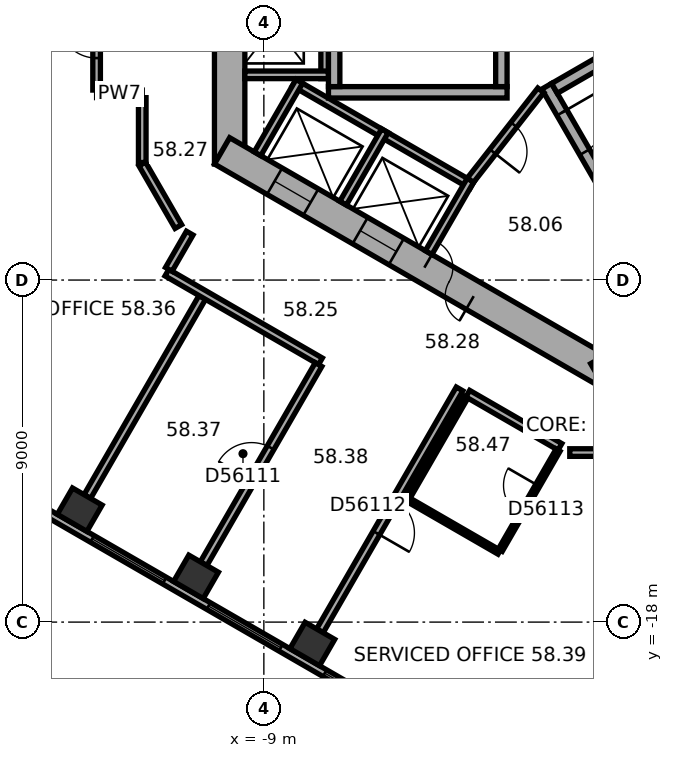
"""IFC4 building model, lengths in metres.
Left out: names, types, materials, properties, quantities, classifications, styles, units other than length and angle.
Written with IfcOpenShell. Run it as: python <this file> out.ifc"""

import sys

from ifc_helpers import new_model, si_unit, direction, frame, frame_2d, origin, origin_2d, place, context, subcontext, project, spatial, rectangle, extrude, element, fill, save


model = new_model("IFC4")
c1 = context("Model", 3, precision=1e-05, world=origin(), true_north=direction((0.0, 1.0)))
c2 = subcontext(c1, "Body", "Model", "MODEL_VIEW")
j1 = project(units=[si_unit("LENGTHUNIT", "METRE"), si_unit("PLANEANGLEUNIT", "RADIAN")], contexts=[c1])
p1 = place(None, origin())
s1 = spatial("IfcSite", under=j1, at=p1, CompositionType="ELEMENT")
p2 = place(p1, origin())
s2 = spatial("IfcBuilding", under=s1, at=p2, CompositionType="ELEMENT")
p3 = place(p2, frame((0.0, 0.0, 236.5)))
s3 = spatial("IfcBuildingStorey", under=s2, at=p3, CompositionType="ELEMENT", Elevation=236.5)
for number, where, z_axis, x_axis in (
    (1, (-13.845, -15.042, 0.0), (0.0, 0.0, 1.0), (0.866, -0.5, 0.0)),
    (2, (-10.785, -16.809, 0.0), (0.0, 0.0, 1.0), (0.866, -0.5, 0.0)),
    (3, (-7.725, -18.576, 0.0), (0.0, 0.0, 1.0), (0.866, -0.5, 0.0)),
):
    element("IfcColumn", number, at=place(p3, frame(where, z_axis=z_axis, x_axis=x_axis)), inside=s3, PredefinedType="COLUMN", context=c2, shape_type="SweptSolid", body=[
        extrude(rectangle(XDim=0.9, YDim=0.8, at=origin_2d()), origin(), (0.0, 0.0, 1.0), 3.7),
    ])
p4 = place(p3, frame((-9.9, 5.947, 0.0), z_axis=(0.0, 0.0, 1.0), x_axis=(0.0, -1.0, 0.0)))
e4 = element("IfcWall", 4, at=p4, inside=s3, PredefinedType="SHEAR", context=c2, shape_type="SweptSolid", body=[
    extrude(rectangle(XDim=11.894, YDim=0.8, at=frame_2d((5.947, 0.0))), origin(), (0.0, 0.0, 1.0), 3.7),
])
p5 = place(p4, frame((5.097, 0.0, 0.0)))
e5 = element("IfcOpeningElement", 5, at=p5, cuts=e4, PredefinedType="OPENING", context=c2, shape_type="SweptSolid", body=[
    extrude(rectangle(XDim=1.1, YDim=2.1, at=frame_2d((0.55, 1.05))), frame((0.0, 0.41, 0.0), z_axis=(0.0, -1.0, 0.0), x_axis=(1.0, 0.0, 0.0)), (0.0, 0.0, 1.0), 0.82),
])
p6 = place(p4, frame((7.697, 0.0, 0.0)))
e6 = element("IfcOpeningElement", 6, at=p6, cuts=e4, PredefinedType="OPENING", context=c2, shape_type="SweptSolid", body=[
    extrude(rectangle(XDim=1.1, YDim=2.1, at=frame_2d((0.55, 1.05))), frame((0.0, 0.41, 0.0), z_axis=(0.0, -1.0, 0.0), x_axis=(1.0, 0.0, 0.0)), (0.0, 0.0, 1.0), 0.82),
])
p7 = place(p3, frame((-10.1, -5.6, 0.0), z_axis=(0.0, 0.0, 1.0), x_axis=(0.866023897231, -0.500002609418, 0.0)))
e7 = element("IfcWall", 7, at=p7, inside=s3, PredefinedType="SHEAR", context=c2, shape_type="SweptSolid", body=[
    extrude(rectangle(XDim=11.894, YDim=0.8, at=frame_2d((5.947, 0.0))), origin(), (0.0, 0.0, 1.0), 3.7),
])
p8 = place(p7, frame((6.147, 0.0, 0.0)))
e8 = element("IfcOpeningElement", 8, at=p8, cuts=e7, PredefinedType="OPENING", context=c2, shape_type="SweptSolid", body=[
    extrude(rectangle(XDim=1.5, YDim=2.1, at=frame_2d((0.75, 1.05))), frame((0.0, 0.41, 0.0), z_axis=(0.0, -1.0, 0.0), x_axis=(1.0, 0.0, 0.0)), (0.0, 0.0, 1.0), 0.82),
])
p9 = place(p7, frame((1.597, 0.0, 0.0)))
e9 = element("IfcOpeningElement", 9, at=p9, cuts=e7, PredefinedType="OPENING", context=c2, shape_type="SweptSolid", body=[
    extrude(rectangle(XDim=1.1, YDim=2.1, at=frame_2d((0.55, 1.05))), frame((0.0, 0.41, 0.0), z_axis=(0.0, -1.0, 0.0), x_axis=(1.0, 0.0, 0.0)), (0.0, 0.0, 1.0), 0.82),
])
p10 = place(p7, frame((4.197, 0.0, 0.0)))
e10 = element("IfcOpeningElement", 10, at=p10, cuts=e7, PredefinedType="OPENING", context=c2, shape_type="SweptSolid", body=[
    extrude(rectangle(XDim=1.1, YDim=2.1, at=frame_2d((0.55, 1.05))), frame((0.0, 0.41, 0.0), z_axis=(0.0, -1.0, 0.0), x_axis=(1.0, 0.0, 0.0)), (0.0, 0.0, 1.0), 0.82),
])
p11 = place(p3, frame((-0.2, -11.547, 0.0), z_axis=(0.0, 0.0, 1.0), x_axis=(0.866023897231, 0.500002609418, 0.0)))
e11 = element("IfcWall", 11, at=p11, inside=s3, PredefinedType="SHEAR", context=c2, shape_type="SweptSolid", body=[
    extrude(rectangle(XDim=11.894, YDim=0.8, at=frame_2d((5.947, 0.0))), origin(), (0.0, 0.0, 1.0), 3.7),
])
p12 = place(p11, frame((2.497, 0.0, 0.0)))
e12 = element("IfcOpeningElement", 12, at=p12, cuts=e11, PredefinedType="OPENING", context=c2, shape_type="SweptSolid", body=[
    extrude(rectangle(XDim=1.1, YDim=2.1, at=frame_2d((0.55, 1.05))), frame((0.0, 0.41, 0.0), z_axis=(0.0, -1.0, 0.0), x_axis=(1.0, 0.0, 0.0)), (0.0, 0.0, 1.0), 0.82),
])
p13 = place(p11, frame((5.097, 0.0, 0.0)))
e13 = element("IfcOpeningElement", 13, at=p13, cuts=e11, PredefinedType="OPENING", context=c2, shape_type="SweptSolid", body=[
    extrude(rectangle(XDim=1.1, YDim=2.1, at=frame_2d((0.55, 1.05))), frame((0.0, 0.41, 0.0), z_axis=(0.0, -1.0, 0.0), x_axis=(1.0, 0.0, 0.0)), (0.0, 0.0, 1.0), 0.82),
])
p14 = place(p11, frame((7.697, 0.0, 0.0)))
e14 = element("IfcOpeningElement", 14, at=p14, cuts=e11, PredefinedType="OPENING", context=c2, shape_type="SweptSolid", body=[
    extrude(rectangle(XDim=1.1, YDim=2.1, at=frame_2d((0.55, 1.05))), frame((0.0, 0.41, 0.0), z_axis=(0.0, -1.0, 0.0), x_axis=(1.0, 0.0, 0.0)), (0.0, 0.0, 1.0), 0.82),
])
p15 = place(p3, frame((-17.664, -13.415, 0.0), z_axis=(0.0, 0.0, 1.0), x_axis=(0.866026555358, -0.49999800541, 0.0)))
e15 = element("IfcWall", 15, at=p15, inside=s3, PredefinedType="STANDARD", context=c2, shape_type="SweptSolid", body=[
    extrude(rectangle(XDim=18.841, YDim=0.2, at=frame_2d((9.421, 0.0))), origin(), (0.0, 0.0, 1.0), 3.7),
])
p16 = place(p15, frame((1.254, 0.0, 0.9)))
e16 = element("IfcOpeningElement", 16, at=p16, cuts=e15, PredefinedType="OPENING", context=c2, shape_type="SweptSolid", body=[
    extrude(rectangle(XDim=2.2, YDim=2.0, at=frame_2d((1.1, 1.0))), frame((0.0, 0.11, 0.0), z_axis=(0.0, -1.0, 0.0), x_axis=(1.0, 0.0, 0.0)), (0.0, 0.0, 1.0), 0.22),
])
p17 = place(p15, frame((4.788, 0.0, 0.9)))
e17 = element("IfcOpeningElement", 17, at=p17, cuts=e15, PredefinedType="OPENING", context=c2, shape_type="SweptSolid", body=[
    extrude(rectangle(XDim=2.2, YDim=2.0, at=frame_2d((1.1, 1.0))), frame((0.0, 0.11, 0.0), z_axis=(0.0, -1.0, 0.0), x_axis=(1.0, 0.0, 0.0)), (0.0, 0.0, 1.0), 0.22),
])
p18 = place(p15, frame((8.322, 0.0, 0.9)))
e18 = element("IfcOpeningElement", 18, at=p18, cuts=e15, PredefinedType="OPENING", context=c2, shape_type="SweptSolid", body=[
    extrude(rectangle(XDim=2.2, YDim=2.0, at=frame_2d((1.1, 1.0))), frame((0.0, 0.11, 0.0), z_axis=(0.0, -1.0, 0.0), x_axis=(1.0, 0.0, 0.0)), (0.0, 0.0, 1.0), 0.22),
])
p19 = place(p15, frame((11.855, 0.0, 0.9)))
e19 = element("IfcOpeningElement", 19, at=p19, cuts=e15, PredefinedType="OPENING", context=c2, shape_type="SweptSolid", body=[
    extrude(rectangle(XDim=2.2, YDim=2.0, at=frame_2d((1.1, 1.0))), frame((0.0, 0.11, 0.0), z_axis=(0.0, -1.0, 0.0), x_axis=(1.0, 0.0, 0.0)), (0.0, 0.0, 1.0), 0.22),
])
p20 = place(p15, frame((15.389, 0.0, 0.9)))
e20 = element("IfcOpeningElement", 20, at=p20, cuts=e15, PredefinedType="OPENING", context=c2, shape_type="SweptSolid", body=[
    extrude(rectangle(XDim=2.2, YDim=2.0, at=frame_2d((1.1, 1.0))), frame((0.0, 0.11, 0.0), z_axis=(0.0, -1.0, 0.0), x_axis=(1.0, 0.0, 0.0)), (0.0, 0.0, 1.0), 0.22),
])
p21 = place(p3, frame((-7.4, 4.3, 0.0), z_axis=(0.0, 0.0, 1.0), x_axis=(0.0, -1.0, 0.0)))
e21 = element("IfcWall", 21, at=p21, inside=s3, PredefinedType="PARTITIONING", context=c2, shape_type="SweptSolid", body=[
    extrude(rectangle(XDim=8.0, YDim=0.2, at=frame_2d((4.0, 0.0))), origin(), (0.0, 0.0, 1.0), 3.42),
])
p22 = place(p3, frame((-7.3, -3.6, 0.0), z_axis=(0.0, 0.0, 1.0), x_axis=(-1.0, 0.0, 0.0)))
e22 = element("IfcWall", 22, at=p22, inside=s3, PredefinedType="PARTITIONING", context=c2, shape_type="SweptSolid", body=[
    extrude(rectangle(XDim=2.2, YDim=0.2, at=frame_2d((1.1, 0.0))), origin(), (0.0, 0.0, 1.0), 3.42),
])
p23 = place(p3, frame((-8.203, -3.809, 0.0), z_axis=(0.0, 0.0, 1.0), x_axis=(0.866028230842, -0.499995103361, 0.0)))
e23 = element("IfcWall", 23, at=p23, inside=s3, PredefinedType="PARTITIONING", context=c2, shape_type="SweptSolid", body=[
    extrude(rectangle(XDim=5.4, YDim=0.2, at=frame_2d((2.7, 0.0))), origin(), (0.0, 0.0, 1.0), 3.42),
])
for number, where, z_axis, x_axis in (
    (24, (-8.067, -3.772, 0.0), (0.0, 0.0, 1.0), (-0.5, -0.866, 0.0)),
    (25, (-5.815, -5.072, 0.0), (0.0, 0.0, 1.0), (-0.5, -0.866, 0.0)),
):
    element("IfcWall", number, at=place(p3, frame(where, z_axis=z_axis, x_axis=x_axis)), inside=s3, PredefinedType="PARTITIONING", context=c2, shape_type="SweptSolid", body=[
        extrude(rectangle(XDim=2.2, YDim=0.2, at=frame_2d((1.1, 0.0))), origin(), (0.0, 0.0, 1.0), 3.42),
    ])
p24 = place(p3, frame((-3.563, -6.372, 0.0), z_axis=(0.0, 0.0, 1.0), x_axis=(-0.499994660107, -0.866028486751, 0.0)))
e26 = element("IfcWall", 26, at=p24, inside=s3, PredefinedType="PARTITIONING", context=c2, shape_type="SweptSolid", body=[
    extrude(rectangle(XDim=2.2, YDim=0.2, at=frame_2d((1.1, 0.0))), origin(), (0.0, 0.0, 1.0), 3.42),
])
p25 = place(p3, frame((-2.6, -4.06, 0.0), z_axis=(0.0, 0.0, 1.0), x_axis=(-1.0, 0.0, 0.0)))
e27 = element("IfcWall", 27, at=p25, inside=s3, PredefinedType="SHEAR", context=c2, shape_type="SweptSolid", body=[
    extrude(rectangle(XDim=4.7, YDim=0.3, at=frame_2d((2.35, 0.0))), origin(), (0.0, 0.0, 1.0), 3.42),
])
for number, where, z_axis, x_axis in (
    (28, (-2.75, 3.15, 0.0), (0.0, 0.0, 1.0), (0.0, -1.0, 0.0)),
    (29, (-7.15, 3.15, 0.0), (0.0, 0.0, 1.0), (0.0, -1.0, 0.0)),
):
    element("IfcWall", number, at=place(p3, frame(where, z_axis=z_axis, x_axis=x_axis)), inside=s3, PredefinedType="SHEAR", context=c2, shape_type="SweptSolid", body=[
        extrude(rectangle(XDim=7.06, YDim=0.3, at=frame_2d((3.53, 0.0))), origin(), (0.0, 0.0, 1.0), 3.42),
    ])
p26 = place(p3, frame((-1.558, -3.902, 0.0), z_axis=(0.0, 0.0, 1.0), x_axis=(0.499977259774, -0.866038532462, 0.0)))
e30 = element("IfcWall", 30, at=p26, inside=s3, PredefinedType="SHEAR", context=c2, shape_type="SweptSolid", body=[
    extrude(rectangle(XDim=4.7, YDim=0.3, at=frame_2d((2.35, 0.0))), origin(), (0.0, 0.0, 1.0), 3.42),
])
p27 = place(p26, frame((0.8, 0.0, 0.0)))
e31 = element("IfcOpeningElement", 31, at=p27, cuts=e30, PredefinedType="OPENING", context=c2, shape_type="SweptSolid", body=[
    extrude(rectangle(XDim=1.2, YDim=2.1, at=frame_2d((0.6, 1.05))), frame((0.0, 0.16, 0.0), z_axis=(0.0, -1.0, 0.0), x_axis=(1.0, 0.0, 0.0)), (0.0, 0.0, 1.0), 0.32),
])
p28 = place(p3, frame((-1.353, -3.957, 0.0), z_axis=(0.0, 0.0, 1.0), x_axis=(0.866027801685, 0.499995846692, 0.0)))
e32 = element("IfcWall", 32, at=p28, inside=s3, PredefinedType="SHEAR", context=c2, shape_type="SweptSolid", body=[
    extrude(rectangle(XDim=7.06, YDim=0.3, at=frame_2d((3.53, 0.0))), origin(), (0.0, 0.0, 1.0), 3.42),
])
p29 = place(p3, frame((-1.712, -4.008, 0.0), z_axis=(0.0, 0.0, 1.0), x_axis=(-0.616549420702, -0.787316208287, 0.0)))
e33 = element("IfcWall", 33, at=p29, inside=s3, PredefinedType="PARTITIONING", context=c2, shape_type="SweptSolid", body=[
    extrude(rectangle(XDim=3.002, YDim=0.2, at=frame_2d((1.501, 0.0))), origin(), (0.0, 0.0, 1.0), 3.42),
])
p30 = place(p29, frame((1.15, 0.0, 0.0)))
e34 = element("IfcOpeningElement", 34, at=p30, cuts=e33, PredefinedType="OPENING", context=c2, shape_type="SweptSolid", body=[
    extrude(rectangle(XDim=0.9, YDim=2.1, at=frame_2d((0.45, 1.05))), frame((0.0, 0.11, 0.0), z_axis=(0.0, -1.0, 0.0), x_axis=(1.0, 0.0, 0.0)), (0.0, 0.0, 1.0), 0.22),
])
p31 = place(p3, frame((-13.646, -14.696, 0.0), z_axis=(0.0, 0.0, 1.0), x_axis=(0.500006596359, 0.866021595341, 0.0)))
e35 = element("IfcWall", 35, at=p31, inside=s3, PredefinedType="PARTITIONING", context=c2, shape_type="SweptSolid", body=[
    extrude(rectangle(XDim=6.049, YDim=0.2, at=frame_2d((3.025, 0.0))), origin(), (0.0, 0.0, 1.0), 3.42),
])
p32 = place(p3, frame((-13.401, -4.101, 0.0), z_axis=(0.0, 0.0, 1.0), x_axis=(1.0, 0.0, 0.0)))
e36 = element("IfcWall", 36, at=p32, inside=s3, PredefinedType="PARTITIONING", context=c2, shape_type="SweptSolid", body=[
    extrude(rectangle(XDim=1.201, YDim=0.2, at=frame_2d((0.601, 0.0))), origin(), (0.0, 0.0, 1.0), 3.42),
])
p33 = place(p3, frame((-13.401, 1.533, 0.0), z_axis=(0.0, 0.0, 1.0), x_axis=(0.0, -1.0, 0.0)))
e37 = element("IfcWall", 37, at=p33, inside=s3, PredefinedType="PARTITIONING", context=c2, shape_type="SweptSolid", body=[
    extrude(rectangle(XDim=5.534, YDim=0.2, at=frame_2d((2.767, 0.0))), origin(), (0.0, 0.0, 1.0), 3.42),
])
p34 = place(p33, frame((3.692, 0.0, 0.0)))
e38 = element("IfcOpeningElement", 38, at=p34, cuts=e37, PredefinedType="OPENING", context=c2, shape_type="SweptSolid", body=[
    extrude(rectangle(XDim=1.0, YDim=2.1, at=frame_2d((0.5, 1.05))), frame((0.0, 0.11, 0.0), z_axis=(0.0, -1.0, 0.0), x_axis=(1.0, 0.0, 0.0)), (0.0, 0.0, 1.0), 0.22),
])
p35 = place(p3, frame((-12.2, -5.947, 0.0), z_axis=(0.0, 0.0, 1.0), x_axis=(0.500022797313, -0.86601224135, 0.0)))
e39 = element("IfcWall", 39, at=p35, inside=s3, PredefinedType="PARTITIONING", context=c2, shape_type="SweptSolid", body=[
    extrude(rectangle(XDim=1.9, YDim=0.2, at=frame_2d((0.95, 0.0))), origin(), (0.0, 0.0, 1.0), 3.42),
])
p36 = place(p3, frame((-12.2, -4.201, 0.0), z_axis=(0.0, 0.0, 1.0), x_axis=(0.0, -1.0, 0.0)))
e40 = element("IfcWall", 40, at=p36, inside=s3, PredefinedType="PARTITIONING", context=c2, shape_type="SweptSolid", body=[
    extrude(rectangle(XDim=1.706, YDim=0.2, at=frame_2d((0.853, 0.0))), origin(), (0.0, 0.0, 1.0), 3.42),
])
p37 = place(p3, frame((-11.551, -8.805, 0.0), z_axis=(0.0, 0.0, 1.0), x_axis=(0.866038310922, -0.499977643516, 0.0)))
e41 = element("IfcWall", 41, at=p37, inside=s3, PredefinedType="PARTITIONING", context=c2, shape_type="SweptSolid", body=[
    extrude(rectangle(XDim=4.665, YDim=0.2, at=frame_2d((2.333, 0.0))), origin(), (0.0, 0.0, 1.0), 3.42),
])
p38 = place(p3, frame((-10.951, -7.765, 0.0), z_axis=(0.0, 0.0, 1.0), x_axis=(-0.499978356969, -0.866037899034, 0.0)))
e42 = element("IfcWall", 42, at=p38, inside=s3, PredefinedType="PARTITIONING", context=c2, shape_type="SweptSolid", body=[
    extrude(rectangle(XDim=1.101, YDim=0.2, at=frame_2d((0.551, 0.0))), origin(), (0.0, 0.0, 1.0), 3.42),
])
p39 = place(p3, frame((-10.585, -16.463, 0.0), z_axis=(0.0, 0.0, 1.0), x_axis=(0.499993802756, 0.866028981735, 0.0)))
e43 = element("IfcWall", 43, at=p39, inside=s3, PredefinedType="PARTITIONING", context=c2, shape_type="SweptSolid", body=[
    extrude(rectangle(XDim=6.049, YDim=0.2, at=frame_2d((3.024, 0.0))), origin(), (0.0, 0.0, 1.0), 2.87),
])
p40 = place(p39, frame((2.524, 0.0, 0.0)))
e44 = element("IfcOpeningElement", 44, at=p40, cuts=e43, PredefinedType="OPENING", context=c2, shape_type="SweptSolid", body=[
    extrude(rectangle(XDim=1.0, YDim=2.1, at=frame_2d((0.5, 1.05))), frame((0.0, 0.11, 0.0), z_axis=(0.0, -1.0, 0.0), x_axis=(1.0, 0.0, 0.0)), (0.0, 0.0, 1.0), 0.22),
])
p41 = place(p3, frame((-7.525, -18.23, 0.0), z_axis=(0.0, 0.0, 1.0), x_axis=(0.499983153418, 0.866035129944, 0.0)))
e45 = element("IfcWall", 45, at=p41, inside=s3, PredefinedType="PARTITIONING", context=c2, shape_type="SweptSolid", body=[
    extrude(rectangle(XDim=7.35, YDim=0.2, at=frame_2d((3.675, 0.0))), origin(), (0.0, 0.0, 1.0), 3.42),
])
p42 = place(p41, frame((2.975, 0.0, 0.0)))
e46 = element("IfcOpeningElement", 46, at=p42, cuts=e45, PredefinedType="OPENING", context=c2, shape_type="SweptSolid", body=[
    extrude(rectangle(XDim=1.0, YDim=2.1, at=frame_2d((0.5, 1.05))), frame((0.0, 0.11, 0.0), z_axis=(0.0, -1.0, 0.0), x_axis=(1.0, 0.0, 0.0)), (0.0, 0.0, 1.0), 0.22),
])
p43 = place(p3, frame((-5.233, -14.761, 0.0), z_axis=(0.0, 0.0, 1.0), x_axis=(0.499967891604, 0.866043940782, 0.0)))
e47 = element("IfcWall", 47, at=p43, inside=s3, PredefinedType="PARTITIONING", context=c2, shape_type="SweptSolid", body=[
    extrude(rectangle(XDim=3.1, YDim=0.12, at=frame_2d((1.55, 0.0))), origin(), (0.0, 0.0, 1.0), 3.42),
])
p44 = place(p3, frame((-3.634, -11.99, 0.0), z_axis=(0.0, 0.0, 1.0), x_axis=(0.866018616679, -0.500011755427, 0.0)))
e48 = element("IfcWall", 48, at=p44, inside=s3, PredefinedType="PARTITIONING", context=c2, shape_type="SweptSolid", body=[
    extrude(rectangle(XDim=2.8, YDim=0.2, at=frame_2d((1.4, 0.0))), origin(), (0.0, 0.0, 1.0), 3.42),
])
p45 = place(p3, frame((-2.809, -16.161, 0.0), z_axis=(0.0, 0.0, 1.0), x_axis=(-0.865997131366, 0.500048966069, 0.0)))
e49 = element("IfcWall", 49, at=p45, inside=s3, PredefinedType="PARTITIONING", context=c2, shape_type="SweptSolid", body=[
    extrude(rectangle(XDim=2.74, YDim=0.12, at=frame_2d((1.37, 0.0))), origin(), (0.0, 0.0, 1.0), 3.42),
])
p46 = place(p3, frame((-1.259, -13.476, 0.0), z_axis=(0.0, 0.0, 1.0), x_axis=(-0.500026023896, -0.86601037836, 0.0)))
e50 = element("IfcWall", 50, at=p46, inside=s3, PredefinedType="PARTITIONING", context=c2, shape_type="SweptSolid", body=[
    extrude(rectangle(XDim=3.04, YDim=0.12, at=frame_2d((1.52, 0.0))), origin(), (0.0, 0.0, 1.0), 3.42),
])
p47 = place(p46, frame((1.07, 0.0, 0.0)))
e51 = element("IfcOpeningElement", 51, at=p47, cuts=e50, PredefinedType="OPENING", context=c2, shape_type="SweptSolid", body=[
    extrude(rectangle(XDim=0.9, YDim=2.1, at=frame_2d((0.45, 1.05))), frame((0.0, 0.07, 0.0), z_axis=(0.0, -1.0, 0.0), x_axis=(1.0, 0.0, 0.0)), (0.0, 0.0, 1.0), 0.14),
])
p48 = place(p3, frame((-0.95, -13.539, 0.0), z_axis=(0.0, 0.0, 1.0), x_axis=(1.0, 0.0, 0.0)))
e52 = element("IfcWall", 52, at=p48, inside=s3, PredefinedType="PARTITIONING", context=c2, shape_type="SweptSolid", body=[
    extrude(rectangle(XDim=1.9, YDim=0.2, at=frame_2d((0.95, 0.0))), origin(), (0.0, 0.0, 1.0), 3.42),
])
p49 = place(p17, origin())
e53 = element("IfcWindow", 53, at=p49, inside=s3, PartitioningType="SINGLE_PANEL", PredefinedType="WINDOW", context=c2, shape_type="SweptSolid", body=[
    extrude(rectangle(XDim=2.2, YDim=2.0, at=frame_2d((1.1, 1.0))), frame((0.0, 0.03, 0.0), z_axis=(0.0, -1.0, 0.0), x_axis=(1.0, 0.0, 0.0)), (0.0, 0.0, 1.0), 0.06),
])
fill(e17, e53)
p50 = place(p18, origin())
e54 = element("IfcWindow", 54, at=p50, inside=s3, PartitioningType="SINGLE_PANEL", PredefinedType="WINDOW", context=c2, shape_type="SweptSolid", body=[
    extrude(rectangle(XDim=2.2, YDim=2.0, at=frame_2d((1.1, 1.0))), frame((0.0, 0.03, 0.0), z_axis=(0.0, -1.0, 0.0), x_axis=(1.0, 0.0, 0.0)), (0.0, 0.0, 1.0), 0.06),
])
fill(e18, e54)
p51 = place(p19, origin())
e55 = element("IfcWindow", 55, at=p51, inside=s3, PartitioningType="SINGLE_PANEL", PredefinedType="WINDOW", context=c2, shape_type="SweptSolid", body=[
    extrude(rectangle(XDim=2.2, YDim=2.0, at=frame_2d((1.1, 1.0))), frame((0.0, 0.03, 0.0), z_axis=(0.0, -1.0, 0.0), x_axis=(1.0, 0.0, 0.0)), (0.0, 0.0, 1.0), 0.06),
])
fill(e19, e55)
p52 = place(p8, origin())
e56 = element("IfcDoor", 56, at=p52, inside=s3, OperationType="DOUBLE_DOOR_SINGLE_SWING", PredefinedType="DOOR", context=c2, shape_type="SweptSolid", body=[
    extrude(rectangle(XDim=1.5, YDim=2.1, at=frame_2d((0.75, 1.05))), frame((0.0, 0.025, 0.0), z_axis=(0.0, -1.0, 0.0), x_axis=(1.0, 0.0, 0.0)), (0.0, 0.0, 1.0), 0.05),
])
fill(e8, e56)
p53 = place(p27, origin())
e57 = element("IfcDoor", 57, at=p53, inside=s3, OperationType="SINGLE_SWING_RIGHT", PredefinedType="DOOR", context=c2, shape_type="SweptSolid", body=[
    extrude(rectangle(XDim=1.2, YDim=2.1, at=frame_2d((0.6, 1.05))), frame((0.0, 0.025, 0.0), z_axis=(0.0, -1.0, 0.0), x_axis=(1.0, 0.0, 0.0)), (0.0, 0.0, 1.0), 0.05),
])
fill(e31, e57)
p54 = place(p30, origin())
e58 = element("IfcDoor", 58, at=p54, inside=s3, OperationType="SINGLE_SWING_LEFT", PredefinedType="DOOR", context=c2, shape_type="SweptSolid", body=[
    extrude(rectangle(XDim=0.9, YDim=2.1, at=frame_2d((0.45, 1.05))), frame((0.0, 0.025, 0.0), z_axis=(0.0, -1.0, 0.0), x_axis=(1.0, 0.0, 0.0)), (0.0, 0.0, 1.0), 0.05),
])
fill(e34, e58)
p55 = place(p9, origin())
e59 = element("IfcDoor", 59, at=p55, inside=s3, OperationType="DOUBLE_DOOR_SLIDING", PredefinedType="DOOR", context=c2, shape_type="SweptSolid", body=[
    extrude(rectangle(XDim=1.1, YDim=2.1, at=frame_2d((0.55, 1.05))), frame((0.0, 0.025, 0.0), z_axis=(0.0, -1.0, 0.0), x_axis=(1.0, 0.0, 0.0)), (0.0, 0.0, 1.0), 0.05),
])
fill(e9, e59)
p56 = place(p10, origin())
e60 = element("IfcDoor", 60, at=p56, inside=s3, OperationType="DOUBLE_DOOR_SLIDING", PredefinedType="DOOR", context=c2, shape_type="SweptSolid", body=[
    extrude(rectangle(XDim=1.1, YDim=2.1, at=frame_2d((0.55, 1.05))), frame((0.0, 0.025, 0.0), z_axis=(0.0, -1.0, 0.0), x_axis=(1.0, 0.0, 0.0)), (0.0, 0.0, 1.0), 0.05),
])
fill(e10, e60)
p57 = place(p34, origin())
e61 = element("IfcDoor", 61, at=p57, inside=s3, OperationType="SINGLE_SWING_LEFT", PredefinedType="DOOR", context=c2, shape_type="SweptSolid", body=[
    extrude(rectangle(XDim=1.0, YDim=2.1, at=frame_2d((0.5, 1.05))), frame((0.0, 0.025, 0.0), z_axis=(0.0, -1.0, 0.0), x_axis=(1.0, 0.0, 0.0)), (0.0, 0.0, 1.0), 0.05),
])
fill(e38, e61)
p58 = place(p40, origin())
e62 = element("IfcDoor", 62, at=p58, inside=s3, OperationType="SINGLE_SWING_LEFT", PredefinedType="DOOR", context=c2, shape_type="SweptSolid", body=[
    extrude(rectangle(XDim=1.0, YDim=2.1, at=frame_2d((0.5, 1.05))), frame((0.0, 0.025, 0.0), z_axis=(0.0, -1.0, 0.0), x_axis=(1.0, 0.0, 0.0)), (0.0, 0.0, 1.0), 0.05),
])
fill(e44, e62)
p59 = place(p42, origin())
e63 = element("IfcDoor", 63, at=p59, inside=s3, OperationType="SINGLE_SWING_LEFT", PredefinedType="DOOR", context=c2, shape_type="SweptSolid", body=[
    extrude(rectangle(XDim=1.0, YDim=2.1, at=frame_2d((0.5, 1.05))), frame((0.0, 0.025, 0.0), z_axis=(0.0, -1.0, 0.0), x_axis=(1.0, 0.0, 0.0)), (0.0, 0.0, 1.0), 0.05),
])
fill(e46, e63)
p60 = place(p47, origin())
e64 = element("IfcDoor", 64, at=p60, inside=s3, OperationType="SINGLE_SWING_LEFT", PredefinedType="DOOR", context=c2, shape_type="SweptSolid", body=[
    extrude(rectangle(XDim=0.9, YDim=2.1, at=frame_2d((0.45, 1.05))), frame((0.0, 0.025, 0.0), z_axis=(0.0, -1.0, 0.0), x_axis=(1.0, 0.0, 0.0)), (0.0, 0.0, 1.0), 0.05),
])
fill(e51, e64)
save(model, sys.argv[1])
